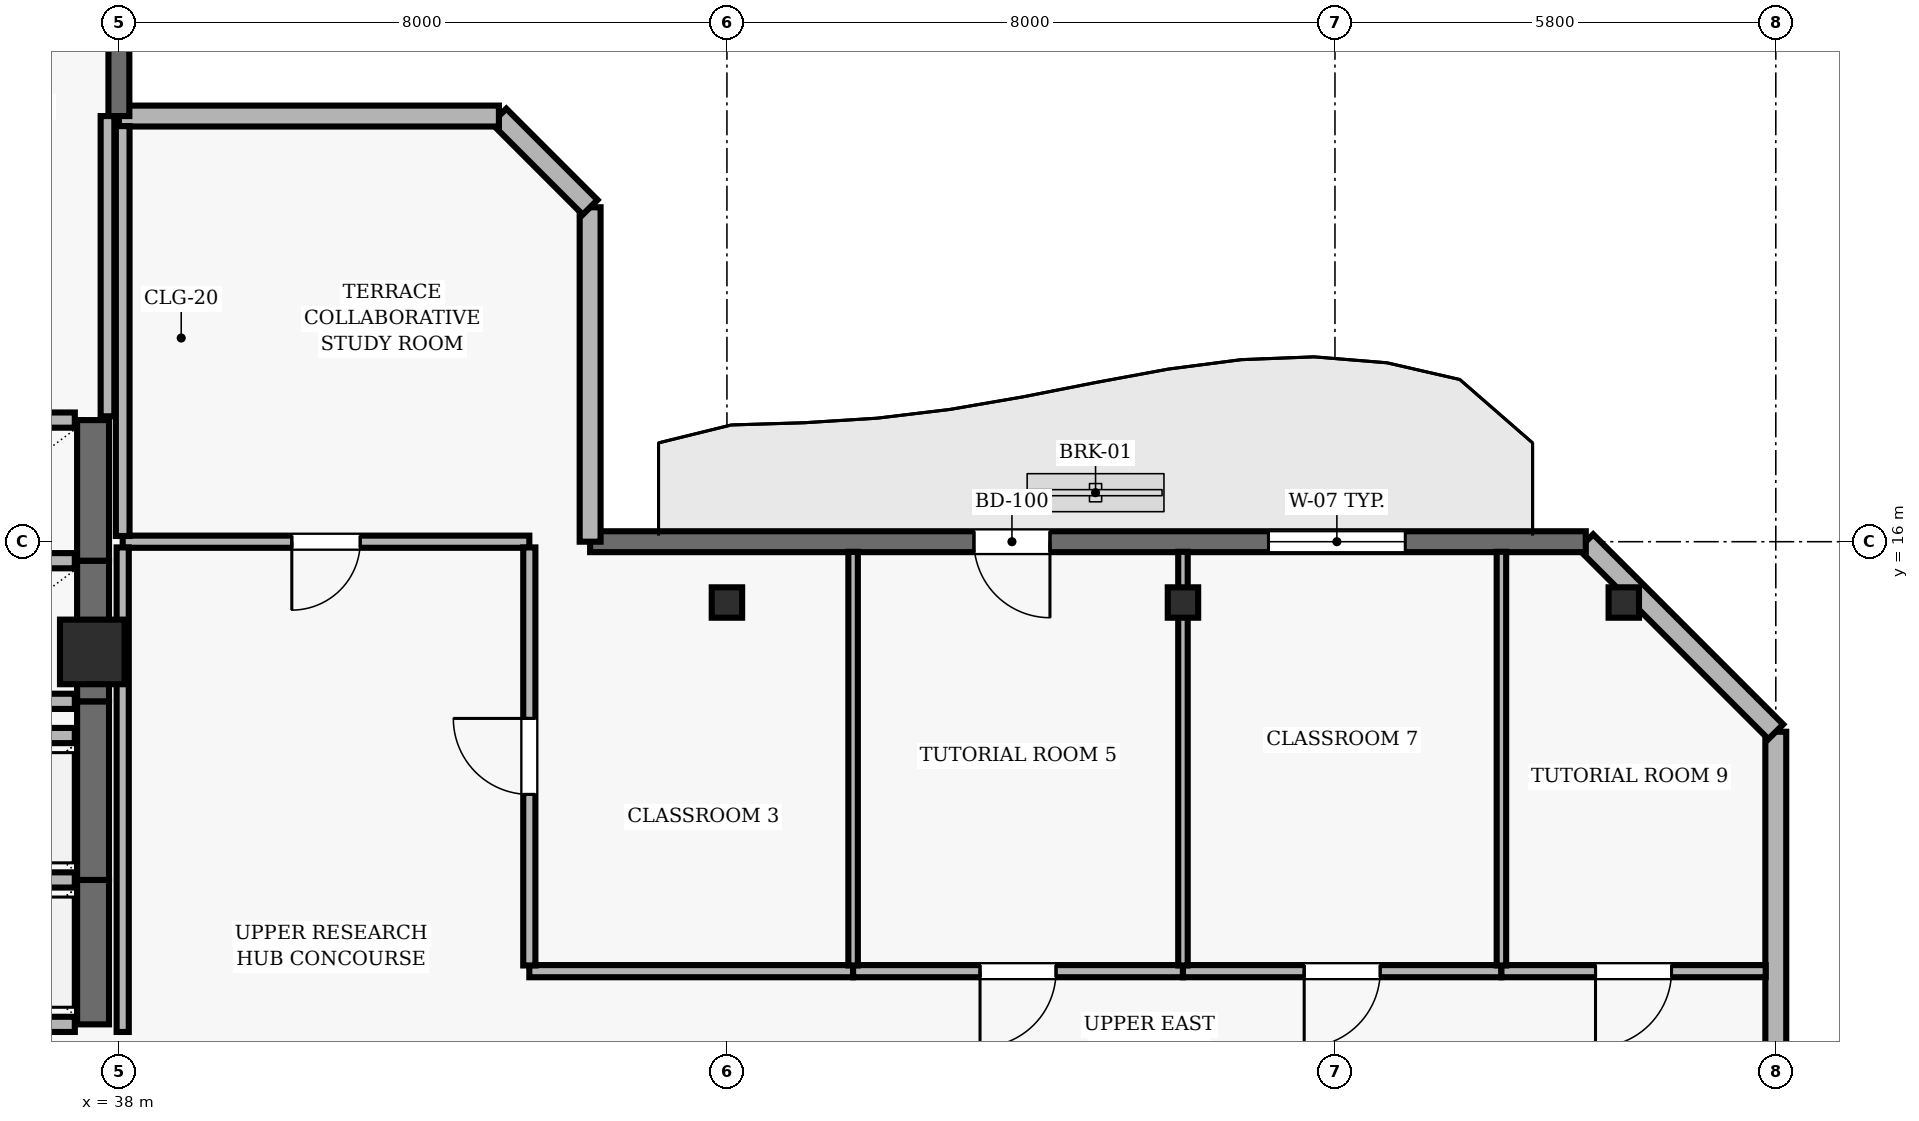
"""IFC4 building model, lengths in metres.
Left out: names, types, materials, properties, quantities, classifications, styles, units other than length and angle.
Written with IfcOpenShell. Run it as: python <this file> out.ifc"""

import sys

from ifc_helpers import new_model, si_unit, direction, frame, frame_2d, origin, origin_2d, place, context, subcontext, project, spatial, rectangle, hollow_rectangle, extrude, element, fill, save


model = new_model("IFC4")
c1 = context("Model", 3, precision=1e-05, world=origin(), true_north=direction((0.0, 1.0)))
c2 = subcontext(c1, "Body", "Model", "MODEL_VIEW")
j1 = project(units=[si_unit("LENGTHUNIT", "METRE"), si_unit("PLANEANGLEUNIT", "RADIAN")], contexts=[c1])
p1 = place(None, origin())
s1 = spatial("IfcSite", under=j1, at=p1, CompositionType="ELEMENT")
p2 = place(p1, origin())
s2 = spatial("IfcBuilding", under=s1, at=p2, CompositionType="ELEMENT")
p3 = place(p2, frame((0.0, 0.0, 302.8)))
s3 = spatial("IfcBuildingStorey", under=s2, at=p3, CompositionType="ELEMENT", Elevation=302.8)
p4 = place(p3, frame((37.65, 14.55, 0.0), z_axis=(0.0, 0.0, 1.0), x_axis=(1.0, 0.0, 0.0)))
e1 = element("IfcColumn", 1, at=p4, inside=s3, PredefinedType="COLUMN", context=c2, shape_type="SweptSolid", body=[
    extrude(rectangle(XDim=0.85, YDim=0.85, at=origin_2d()), origin(), (0.0, 0.0, 1.0), 3.9),
])
for number, where, z_axis, x_axis in (
    (2, (46.0, 15.2, 0.0), (0.0, 0.0, 1.0), (1.0, 0.0, 0.0)),
    (3, (52.0, 15.2, 0.0), (0.0, 0.0, 1.0), (1.0, 0.0, 0.0)),
    (4, (57.8, 15.2, 0.0), (0.0, 0.0, 1.0), (1.0, 0.0, 0.0)),
):
    element("IfcColumn", number, at=place(p3, frame(where, z_axis=z_axis, x_axis=x_axis)), inside=s3, PredefinedType="COLUMN", context=c2, shape_type="SweptSolid", body=[
        extrude(hollow_rectangle(XDim=0.4, YDim=0.4, WallThickness=0.02, at=origin_2d()), origin(), (0.0, 0.0, 1.0), 3.9),
    ])
p5 = place(p3, frame((59.8, 2.5, 0.0), z_axis=(0.0, 0.0, 1.0), x_axis=(0.0, 1.0, 0.0)))
e5 = element("IfcWall", 5, at=p5, inside=s3, PredefinedType="SOLIDWALL", context=c2, shape_type="SweptSolid", body=[
    extrude(rectangle(XDim=11.0, YDim=0.275, at=frame_2d((5.5, 0.0))), origin(), (0.0, 0.0, 1.0), 3.64),
])
p6 = place(p5, frame((1.55, 0.0, 0.9)))
e6 = element("IfcOpeningElement", 6, at=p6, cuts=e5, PredefinedType="OPENING", context=c2, shape_type="SweptSolid", body=[
    extrude(rectangle(XDim=2.4, YDim=1.6, at=frame_2d((1.2, 0.8))), frame((0.0, 0.147, 0.0), z_axis=(0.0, -1.0, 0.0), x_axis=(1.0, 0.0, 0.0)), (0.0, 0.0, 1.0), 0.295),
])
p7 = place(p3, frame((59.8, 13.5, 0.0), z_axis=(0.0, 0.0, 1.0), x_axis=(-0.707106781187, 0.707106781187, 0.0)))
e7 = element("IfcWall", 7, at=p7, inside=s3, PredefinedType="SOLIDWALL", context=c2, shape_type="SweptSolid", body=[
    extrude(rectangle(XDim=3.536, YDim=0.275, at=frame_2d((1.768, 0.0))), origin(), (0.0, 0.0, 1.0), 3.64),
])
p8 = place(p3, frame((57.3, 16.0, 0.0), z_axis=(0.0, 0.0, 1.0), x_axis=(-1.0, 0.0, 0.0)))
e8 = element("IfcWall", 8, at=p8, inside=s3, PredefinedType="SOLIDWALL", context=c2, shape_type="SweptSolid", body=[
    extrude(rectangle(XDim=13.1, YDim=0.275, at=frame_2d((6.55, 0.0))), origin(), (0.0, 0.0, 1.0), 3.64),
])
p9 = place(p8, frame((7.05, 0.0, 0.0)))
e9 = element("IfcOpeningElement", 9, at=p9, cuts=e8, PredefinedType="OPENING", context=c2, shape_type="SweptSolid", body=[
    extrude(rectangle(XDim=1.0, YDim=2.2, at=frame_2d((0.5, 1.1))), frame((0.0, 0.147, 0.0), z_axis=(0.0, -1.0, 0.0), x_axis=(1.0, 0.0, 0.0)), (0.0, 0.0, 1.0), 0.295),
])
p10 = place(p8, frame((2.375, 0.0, 0.9)))
e10 = element("IfcOpeningElement", 10, at=p10, cuts=e8, PredefinedType="OPENING", context=c2, shape_type="SweptSolid", body=[
    extrude(rectangle(XDim=1.8, YDim=1.8, at=frame_2d((0.9, 0.9))), frame((0.0, 0.147, 0.0), z_axis=(0.0, -1.0, 0.0), x_axis=(1.0, 0.0, 0.0)), (0.0, 0.0, 1.0), 0.295),
])
p11 = place(p3, frame((44.2, 16.0, 0.0), z_axis=(0.0, 0.0, 1.0), x_axis=(0.0, 1.0, 0.0)))
e11 = element("IfcWall", 11, at=p11, inside=s3, PredefinedType="SOLIDWALL", context=c2, shape_type="SweptSolid", body=[
    extrude(rectangle(XDim=4.4, YDim=0.275, at=frame_2d((2.2, 0.0))), origin(), (0.0, 0.0, 1.0), 3.64),
])
p12 = place(p3, frame((44.2, 20.4, 0.0), z_axis=(0.0, 0.0, 1.0), x_axis=(-0.707034851297, 0.707178703759, 0.0)))
e12 = element("IfcWall", 12, at=p12, inside=s3, PredefinedType="SOLIDWALL", context=c2, shape_type="SweptSolid", body=[
    extrude(rectangle(XDim=1.697, YDim=0.275, at=frame_2d((0.849, 0.0))), origin(), (0.0, 0.0, 1.0), 3.64),
])
p13 = place(p3, frame((43.0, 21.6, 0.0), z_axis=(0.0, 0.0, 1.0), x_axis=(-1.0, 0.0, 0.0)))
e13 = element("IfcWall", 13, at=p13, inside=s3, PredefinedType="SOLIDWALL", context=c2, shape_type="SweptSolid", body=[
    extrude(rectangle(XDim=5.0, YDim=0.275, at=frame_2d((2.5, 0.0))), origin(), (0.0, 0.0, 1.0), 3.64),
])
p14 = place(p3, frame((38.0, 21.6, 0.0), z_axis=(0.0, 0.0, 1.0), x_axis=(0.0, 1.0, 0.0)))
e14 = element("IfcWall", 14, at=p14, inside=s3, PredefinedType="SOLIDWALL", context=c2, shape_type="SweptSolid", body=[
    extrude(rectangle(XDim=13.7, YDim=0.275, at=frame_2d((6.85, 0.0))), origin(), (0.0, 0.0, 1.0), 3.64),
])
p15 = place(p14, frame((5.35, 0.0, 0.0)))
e15 = element("IfcOpeningElement", 15, at=p15, cuts=e14, PredefinedType="OPENING", context=c2, shape_type="SweptSolid", body=[
    extrude(rectangle(XDim=1.0, YDim=2.2, at=frame_2d((0.5, 1.1))), frame((0.0, 0.147, 0.0), z_axis=(0.0, -1.0, 0.0), x_axis=(1.0, 0.0, 0.0)), (0.0, 0.0, 1.0), 0.295),
])
p16 = place(p14, frame((9.075, 0.0, 0.9)))
e16 = element("IfcOpeningElement", 16, at=p16, cuts=e14, PredefinedType="OPENING", context=c2, shape_type="SweptSolid", body=[
    extrude(rectangle(XDim=2.4, YDim=2.2, at=frame_2d((1.2, 1.1))), frame((0.0, 0.147, 0.0), z_axis=(0.0, -1.0, 0.0), x_axis=(1.0, 0.0, 0.0)), (0.0, 0.0, 1.0), 0.295),
])
p17 = place(p3, frame((37.66, 9.65, 0.0), z_axis=(0.0, 0.0, 1.0), x_axis=(0.0, 1.0, 0.0)))
e17 = element("IfcWall", 17, at=p17, inside=s3, PredefinedType="SHEAR", context=c2, shape_type="SweptSolid", body=[
    extrude(rectangle(XDim=1.9, YDim=0.42, at=frame_2d((0.95, 0.0))), origin(), (0.0, 0.0, 1.0), 3.64),
])
for number, where, z_axis, x_axis in (
    (18, (35.28, 9.65, 0.0), (0.0, 0.0, 1.0), (1.0, 0.0, 0.0)),
    (19, (37.42, 11.55, 0.0), (0.0, 0.0, 1.0), (-1.0, 0.0, 0.0)),
):
    element("IfcWall", number, at=place(p3, frame(where, z_axis=z_axis, x_axis=x_axis)), inside=s3, PredefinedType="SOLIDWALL", context=c2, shape_type="SweptSolid", body=[
        extrude(rectangle(XDim=2.14, YDim=0.2, at=frame_2d((1.07, 0.0))), origin(), (0.0, 0.0, 1.0), 3.64),
    ])
p18 = place(p3, frame((37.66, 11.55, 0.0), z_axis=(0.0, 0.0, 1.0), x_axis=(0.0, 1.0, 0.0)))
e20 = element("IfcWall", 20, at=p18, inside=s3, PredefinedType="SHEAR", context=c2, shape_type="SweptSolid", body=[
    extrude(rectangle(XDim=2.35, YDim=0.42, at=frame_2d((1.175, 0.0))), origin(), (0.0, 0.0, 1.0), 3.64),
])
p19 = place(p3, frame((37.42, 13.45, 0.0), z_axis=(0.0, 0.0, 1.0), x_axis=(-1.0, 0.0, 0.0)))
e21 = element("IfcWall", 21, at=p19, inside=s3, PredefinedType="SOLIDWALL", context=c2, shape_type="SweptSolid", body=[
    extrude(rectangle(XDim=2.14, YDim=0.2, at=frame_2d((1.07, 0.0))), origin(), (0.0, 0.0, 1.0), 3.64),
])
p20 = place(p3, frame((37.66, 13.9, 0.0), z_axis=(0.0, 0.0, 1.0), x_axis=(0.0, 1.0, 0.0)))
e22 = element("IfcWall", 22, at=p20, inside=s3, PredefinedType="SHEAR", context=c2, shape_type="SweptSolid", body=[
    extrude(rectangle(XDim=1.85, YDim=0.42, at=frame_2d((0.925, 0.0))), origin(), (0.0, 0.0, 1.0), 3.64),
])
for number, where, z_axis, x_axis in (
    (23, (35.28, 13.9, 0.0), (0.0, 0.0, 1.0), (1.0, 0.0, 0.0)),
    (24, (37.42, 15.75, 0.0), (0.0, 0.0, 1.0), (-1.0, 0.0, 0.0)),
):
    element("IfcWall", number, at=place(p3, frame(where, z_axis=z_axis, x_axis=x_axis)), inside=s3, PredefinedType="SOLIDWALL", context=c2, shape_type="SweptSolid", body=[
        extrude(rectangle(XDim=2.14, YDim=0.2, at=frame_2d((1.07, 0.0))), origin(), (0.0, 0.0, 1.0), 3.64),
    ])
p21 = place(p3, frame((37.66, 15.75, 0.0), z_axis=(0.0, 0.0, 1.0), x_axis=(0.0, 1.0, 0.0)))
e25 = element("IfcWall", 25, at=p21, inside=s3, PredefinedType="SHEAR", context=c2, shape_type="SweptSolid", body=[
    extrude(rectangle(XDim=1.85, YDim=0.42, at=frame_2d((0.925, 0.0))), origin(), (0.0, 0.0, 1.0), 3.64),
])
p22 = place(p3, frame((37.42, 17.6, 0.0), z_axis=(0.0, 0.0, 1.0), x_axis=(-1.0, 0.0, 0.0)))
e26 = element("IfcWall", 26, at=p22, inside=s3, PredefinedType="SOLIDWALL", context=c2, shape_type="SweptSolid", body=[
    extrude(rectangle(XDim=2.14, YDim=0.2, at=frame_2d((1.07, 0.0))), origin(), (0.0, 0.0, 1.0), 3.64),
])
p23 = place(p3, frame((43.4, 16.0, 0.0), z_axis=(0.0, 0.0, 1.0), x_axis=(-1.0, 0.0, 0.0)))
e27 = element("IfcWall", 27, at=p23, inside=s3, PredefinedType="PARTITIONING", context=c2, shape_type="SweptSolid", body=[
    extrude(rectangle(XDim=5.35, YDim=0.16, at=frame_2d((2.675, 0.0))), origin(), (0.0, 0.0, 1.0), 3.34),
])
p24 = place(p23, frame((2.225, 0.0, 0.0)))
e28 = element("IfcOpeningElement", 28, at=p24, cuts=e27, PredefinedType="OPENING", context=c2, shape_type="SweptSolid", body=[
    extrude(rectangle(XDim=0.9, YDim=2.1, at=frame_2d((0.45, 1.05))), frame((0.0, 0.09, 0.0), z_axis=(0.0, -1.0, 0.0), x_axis=(1.0, 0.0, 0.0)), (0.0, 0.0, 1.0), 0.18),
])
p25 = place(p3, frame((47.66, 10.35, 0.0), z_axis=(0.0, 0.0, 1.0), x_axis=(-1.0, 0.0, 0.0)))
e29 = element("IfcWall", 29, at=p25, inside=s3, PredefinedType="PARTITIONING", context=c2, shape_type="SweptSolid", body=[
    extrude(rectangle(XDim=4.26, YDim=0.16, at=frame_2d((2.13, 0.0))), origin(), (0.0, 0.0, 1.0), 3.322),
])
p26 = place(p3, frame((52.0, 10.35, 0.0), z_axis=(0.0, 0.0, 1.0), x_axis=(-1.0, 0.0, 0.0)))
e30 = element("IfcWall", 30, at=p26, inside=s3, PredefinedType="PARTITIONING", context=c2, shape_type="SweptSolid", body=[
    extrude(rectangle(XDim=4.34, YDim=0.16, at=frame_2d((2.17, 0.0))), origin(), (0.0, 0.0, 1.0), 3.322),
])
p27 = place(p26, frame((1.67, 0.0, 0.0)))
e31 = element("IfcOpeningElement", 31, at=p27, cuts=e30, PredefinedType="OPENING", context=c2, shape_type="SweptSolid", body=[
    extrude(rectangle(XDim=1.0, YDim=2.1, at=frame_2d((0.5, 1.05))), frame((0.0, 0.09, 0.0), z_axis=(0.0, -1.0, 0.0), x_axis=(1.0, 0.0, 0.0)), (0.0, 0.0, 1.0), 0.18),
])
p28 = place(p3, frame((56.19, 10.35, 0.0), z_axis=(0.0, 0.0, 1.0), x_axis=(-1.0, 0.0, 0.0)))
e32 = element("IfcWall", 32, at=p28, inside=s3, PredefinedType="PARTITIONING", context=c2, shape_type="SweptSolid", body=[
    extrude(rectangle(XDim=4.19, YDim=0.16, at=frame_2d((2.095, 0.0))), origin(), (0.0, 0.0, 1.0), 3.322),
])
p29 = place(p28, frame((1.595, 0.0, 0.0)))
e33 = element("IfcOpeningElement", 33, at=p29, cuts=e32, PredefinedType="OPENING", context=c2, shape_type="SweptSolid", body=[
    extrude(rectangle(XDim=1.0, YDim=2.1, at=frame_2d((0.5, 1.05))), frame((0.0, 0.09, 0.0), z_axis=(0.0, -1.0, 0.0), x_axis=(1.0, 0.0, 0.0)), (0.0, 0.0, 1.0), 0.18),
])
p30 = place(p3, frame((59.667, 10.35, 0.0), z_axis=(0.0, 0.0, 1.0), x_axis=(-1.0, 0.0, 0.0)))
e34 = element("IfcWall", 34, at=p30, inside=s3, PredefinedType="PARTITIONING", context=c2, shape_type="SweptSolid", body=[
    extrude(rectangle(XDim=3.477, YDim=0.16, at=frame_2d((1.739, 0.0))), origin(), (0.0, 0.0, 1.0), 3.322),
])
p31 = place(p30, frame((1.239, 0.0, 0.0)))
e35 = element("IfcOpeningElement", 35, at=p31, cuts=e34, PredefinedType="OPENING", context=c2, shape_type="SweptSolid", body=[
    extrude(rectangle(XDim=1.0, YDim=2.1, at=frame_2d((0.5, 1.05))), frame((0.0, 0.09, 0.0), z_axis=(0.0, -1.0, 0.0), x_axis=(1.0, 0.0, 0.0)), (0.0, 0.0, 1.0), 0.18),
])
p32 = place(p3, frame((37.85, 17.65, 0.0), z_axis=(0.0, 0.0, 1.0), x_axis=(0.0, 1.0, 0.0)))
e36 = element("IfcWall", 36, at=p32, inside=s3, PredefinedType="PARTITIONING", context=c2, shape_type="SweptSolid", body=[
    extrude(rectangle(XDim=3.95, YDim=0.18, at=frame_2d((1.975, 0.0))), origin(), (0.0, 0.0, 1.0), 3.171),
])
p33 = place(p3, frame((38.05, 15.925, 0.0), z_axis=(0.0, 0.0, 1.0), x_axis=(0.0, -1.0, 0.0)))
e37 = element("IfcWall", 37, at=p33, inside=s3, PredefinedType="PARTITIONING", context=c2, shape_type="SweptSolid", body=[
    extrude(rectangle(XDim=6.375, YDim=0.16, at=frame_2d((3.188, 0.0))), origin(), (0.0, 0.0, 1.0), 3.171),
])
p34 = place(p3, frame((38.05, 21.468, 0.0), z_axis=(0.0, 0.0, 1.0), x_axis=(0.0, -1.0, 0.0)))
e38 = element("IfcWall", 38, at=p34, inside=s3, PredefinedType="PARTITIONING", context=c2, shape_type="SweptSolid", body=[
    extrude(rectangle(XDim=5.393, YDim=0.18, at=frame_2d((2.697, 0.0))), origin(), (0.0, 0.0, 1.0), 3.171),
])
p35 = place(p3, frame((43.4, 10.425, 0.0), z_axis=(0.0, 0.0, 1.0), x_axis=(0.0, 1.0, 0.0)))
e39 = element("IfcWall", 39, at=p35, inside=s3, PredefinedType="PARTITIONING", context=c2, shape_type="SweptSolid", body=[
    extrude(rectangle(XDim=5.5, YDim=0.16, at=frame_2d((2.75, 0.0))), origin(), (0.0, 0.0, 1.0), 3.64),
])
p36 = place(p35, frame((2.25, 0.0, 0.0)))
e40 = element("IfcOpeningElement", 40, at=p36, cuts=e39, PredefinedType="OPENING", context=c2, shape_type="SweptSolid", body=[
    extrude(rectangle(XDim=1.0, YDim=2.1, at=frame_2d((0.5, 1.05))), frame((0.0, 0.09, 0.0), z_axis=(0.0, -1.0, 0.0), x_axis=(1.0, 0.0, 0.0)), (0.0, 0.0, 1.0), 0.18),
])
p37 = place(p3, frame((47.66, 10.425, 0.0), z_axis=(0.0, 0.0, 1.0), x_axis=(0.0, 1.0, 0.0)))
e41 = element("IfcWall", 41, at=p37, inside=s3, PredefinedType="PARTITIONING", context=c2, shape_type="SweptSolid", body=[
    extrude(rectangle(XDim=5.442, YDim=0.125, at=frame_2d((2.721, 0.0))), origin(), (0.0, 0.0, 1.0), 3.64),
])
p38 = place(p3, frame((52.0, 10.425, 0.0), z_axis=(0.0, 0.0, 1.0), x_axis=(0.0, 1.0, 0.0)))
e42 = element("IfcWall", 42, at=p38, inside=s3, PredefinedType="PARTITIONING", context=c2, shape_type="SweptSolid", body=[
    extrude(rectangle(XDim=5.442, YDim=0.125, at=frame_2d((2.721, 0.0))), origin(), (0.0, 0.0, 1.0), 3.171),
])
p39 = place(p3, frame((56.19, 10.425, 0.0), z_axis=(0.0, 0.0, 1.0), x_axis=(0.0, 1.0, 0.0)))
e43 = element("IfcWall", 43, at=p39, inside=s3, PredefinedType="PARTITIONING", context=c2, shape_type="SweptSolid", body=[
    extrude(rectangle(XDim=5.442, YDim=0.125, at=frame_2d((2.721, 0.0))), origin(), (0.0, 0.0, 1.0), 3.64),
])
p40 = place(p9, origin())
e44 = element("IfcDoor", 44, at=p40, inside=s3, OperationType="SINGLE_SWING_LEFT", PredefinedType="DOOR", context=c2, shape_type="SweptSolid", body=[
    extrude(rectangle(XDim=1.0, YDim=2.2, at=frame_2d((0.5, 1.1))), frame((0.0, 0.025, 0.0), z_axis=(0.0, -1.0, 0.0), x_axis=(1.0, 0.0, 0.0)), (0.0, 0.0, 1.0), 0.05),
])
fill(e9, e44)
p41 = place(p10, origin())
e45 = element("IfcWindow", 45, at=p41, inside=s3, PartitioningType="SINGLE_PANEL", PredefinedType="WINDOW", context=c2, shape_type="SweptSolid", body=[
    extrude(rectangle(XDim=1.8, YDim=1.8, at=frame_2d((0.9, 0.9))), frame((0.0, 0.03, 0.0), z_axis=(0.0, -1.0, 0.0), x_axis=(1.0, 0.0, 0.0)), (0.0, 0.0, 1.0), 0.06),
])
fill(e10, e45)
p42 = place(p36, origin())
e46 = element("IfcDoor", 46, at=p42, inside=s3, OperationType="SINGLE_SWING_RIGHT", PredefinedType="DOOR", context=c2, shape_type="SweptSolid", body=[
    extrude(rectangle(XDim=1.0, YDim=2.1, at=frame_2d((0.5, 1.05))), frame((0.0, 0.025, 0.0), z_axis=(0.0, -1.0, 0.0), x_axis=(1.0, 0.0, 0.0)), (0.0, 0.0, 1.0), 0.05),
])
fill(e40, e46)
p43 = place(p27, origin())
e47 = element("IfcDoor", 47, at=p43, inside=s3, OperationType="SINGLE_SWING_RIGHT", PredefinedType="DOOR", context=c2, shape_type="SweptSolid", body=[
    extrude(rectangle(XDim=1.0, YDim=2.1, at=frame_2d((0.5, 1.05))), frame((0.0, 0.025, 0.0), z_axis=(0.0, -1.0, 0.0), x_axis=(1.0, 0.0, 0.0)), (0.0, 0.0, 1.0), 0.05),
])
fill(e31, e47)
p44 = place(p29, origin())
e48 = element("IfcDoor", 48, at=p44, inside=s3, OperationType="SINGLE_SWING_RIGHT", PredefinedType="DOOR", context=c2, shape_type="SweptSolid", body=[
    extrude(rectangle(XDim=1.0, YDim=2.1, at=frame_2d((0.5, 1.05))), frame((0.0, 0.025, 0.0), z_axis=(0.0, -1.0, 0.0), x_axis=(1.0, 0.0, 0.0)), (0.0, 0.0, 1.0), 0.05),
])
fill(e33, e48)
p45 = place(p31, origin())
e49 = element("IfcDoor", 49, at=p45, inside=s3, OperationType="SINGLE_SWING_RIGHT", PredefinedType="DOOR", context=c2, shape_type="SweptSolid", body=[
    extrude(rectangle(XDim=1.0, YDim=2.1, at=frame_2d((0.5, 1.05))), frame((0.0, 0.025, 0.0), z_axis=(0.0, -1.0, 0.0), x_axis=(1.0, 0.0, 0.0)), (0.0, 0.0, 1.0), 0.05),
])
fill(e35, e49)
p46 = place(p24, origin())
e50 = element("IfcDoor", 50, at=p46, inside=s3, OperationType="SINGLE_SWING_RIGHT", PredefinedType="DOOR", context=c2, shape_type="SweptSolid", body=[
    extrude(rectangle(XDim=0.9, YDim=2.1, at=frame_2d((0.45, 1.05))), frame((0.0, 0.025, 0.0), z_axis=(0.0, -1.0, 0.0), x_axis=(1.0, 0.0, 0.0)), (0.0, 0.0, 1.0), 0.05),
])
fill(e28, e50)
save(model, sys.argv[1])
